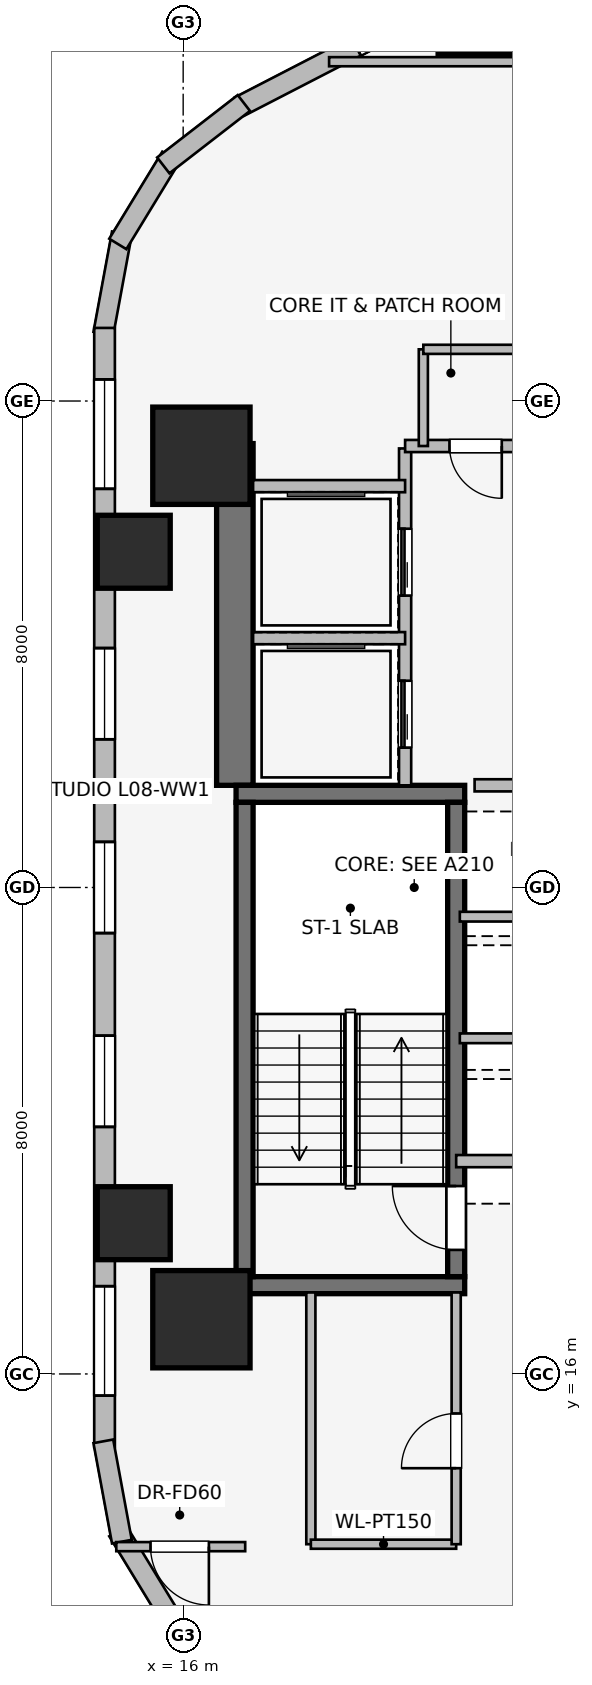
"""IFC4 building model, lengths in metres.
Left out: names, types, materials, properties, quantities, classifications, styles, units other than length and angle.
Written with IfcOpenShell. Run it as: python <this file> out.ifc"""

import sys

from ifc_helpers import new_model, si_unit, direction, frame, frame_2d, origin, origin_2d, place, context, subcontext, project, spatial, rectangle, extrude, element, fill, save


model = new_model("IFC4")
c1 = context("Model", 3, precision=1e-05, world=origin(), true_north=direction((0.0, 1.0)))
c2 = subcontext(c1, "Body", "Model", "MODEL_VIEW")
j1 = project(units=[si_unit("LENGTHUNIT", "METRE"), si_unit("PLANEANGLEUNIT", "RADIAN")], contexts=[c1])
p1 = place(None, origin())
s1 = spatial("IfcSite", under=j1, at=p1, CompositionType="ELEMENT")
p2 = place(p1, origin())
s2 = spatial("IfcBuilding", under=s1, at=p2, CompositionType="ELEMENT")
p3 = place(p2, frame((0.0, 0.0, 34.3)))
s3 = spatial("IfcBuildingStorey", under=s2, at=p3, CompositionType="ELEMENT", Elevation=34.3)
p4 = place(p3, frame((16.85, 25.68, 0.0), z_axis=(0.0, 0.0, 1.0), x_axis=(0.0, 1.0, 0.0)))
e1 = element("IfcWall", 1, at=p4, inside=s3, PredefinedType="SHEAR", context=c2, shape_type="SweptSolid", body=[
    extrude(rectangle(XDim=5.62, YDim=0.6, at=frame_2d((2.81, 0.0))), origin(), (0.0, 0.0, 1.0), 3.65),
])
for number, where, z_axis, x_axis in (
    (2, (16.87, 17.46, 0.0), (0.0, 0.0, 1.0), (1.0, 0.0, 0.0)),
    (3, (20.63, 25.54, 0.0), (0.0, 0.0, 1.0), (-1.0, 0.0, 0.0)),
):
    element("IfcWall", number, at=place(p3, frame(where, z_axis=z_axis, x_axis=x_axis)), inside=s3, PredefinedType="SHEAR", context=c2, shape_type="SweptSolid", body=[
        extrude(rectangle(XDim=3.76, YDim=0.28, at=frame_2d((1.88, 0.0))), origin(), (0.0, 0.0, 1.0), 3.65),
    ])
p5 = place(p3, frame((17.01, 25.4, 0.0), z_axis=(0.0, 0.0, 1.0), x_axis=(0.0, -1.0, 0.0)))
e4 = element("IfcWall", 4, at=p5, inside=s3, PredefinedType="SHEAR", context=c2, shape_type="SweptSolid", body=[
    extrude(rectangle(XDim=7.8, YDim=0.28, at=frame_2d((3.9, 0.0))), origin(), (0.0, 0.0, 1.0), 3.65),
])
p6 = place(p3, frame((20.49, 17.6, 0.0), z_axis=(0.0, 0.0, 1.0), x_axis=(0.0, 1.0, 0.0)))
e5 = element("IfcWall", 5, at=p6, inside=s3, PredefinedType="SHEAR", context=c2, shape_type="SweptSolid", body=[
    extrude(rectangle(XDim=7.8, YDim=0.28, at=frame_2d((3.9, 0.0))), origin(), (0.0, 0.0, 1.0), 3.65),
])
p7 = place(p6, frame((0.44, 0.0, 0.0)))
e6 = element("IfcOpeningElement", 6, at=p7, cuts=e5, PredefinedType="OPENING", context=c2, shape_type="SweptSolid", body=[
    extrude(rectangle(XDim=1.05, YDim=2.0, at=frame_2d((0.525, 1.0))), frame((0.0, 0.15, 0.0), z_axis=(0.0, -1.0, 0.0), x_axis=(1.0, 0.0, 0.0)), (0.0, 0.0, 1.0), 0.3),
])
for number, where, z_axis, x_axis in (
    (7, (16.3, 16.9, 0.0), (0.0, 0.0, 1.0), (1.0, 0.0, 0.0)),
    (8, (16.3, 31.1, 0.0), (0.0, 0.0, 1.0), (1.0, 0.0, 0.0)),
):
    element("IfcColumn", number, at=place(p3, frame(where, z_axis=z_axis, x_axis=x_axis)), inside=s3, PredefinedType="COLUMN", context=c2, shape_type="SweptSolid", body=[
        extrude(rectangle(XDim=1.6, YDim=1.6, at=origin_2d()), origin(), (0.0, 0.0, 1.0), 3.65),
    ])
for number, where, z_axis, x_axis in (
    (9, (20.793, 38.298, 0.0), (0.0, 0.0, 1.0), (1.0, 0.0, 0.0)),
    (10, (15.187, 29.521, 0.0), (0.0, 0.0, 1.0), (1.0, 0.0, 0.0)),
    (11, (15.187, 18.479, 0.0), (0.0, 0.0, 1.0), (1.0, 0.0, 0.0)),
):
    element("IfcColumn", number, at=place(p3, frame(where, z_axis=z_axis, x_axis=x_axis)), inside=s3, PredefinedType="COLUMN", context=c2, shape_type="SweptSolid", body=[
        extrude(rectangle(XDim=1.2, YDim=1.2, at=origin_2d()), origin(), (0.0, 0.0, 1.0), 3.65),
    ])
p8 = place(p3, frame((16.924, 36.841, 0.0), z_axis=(0.0, 0.0, 1.0), x_axis=(0.888634413993, 0.458616264721, 0.0)))
e12 = element("IfcWall", 12, at=p8, inside=s3, PredefinedType="STANDARD", context=c2, shape_type="SweptSolid", body=[
    extrude(rectangle(XDim=20.531, YDim=0.34, at=frame_2d((10.266, 0.0))), origin(), (0.0, 0.0, 1.0), 2.684),
])
p9 = place(p8, frame((2.161, 0.0, 0.75)))
e13 = element("IfcOpeningElement", 13, at=p9, cuts=e12, PredefinedType="OPENING", context=c2, shape_type="SweptSolid", body=[
    extrude(rectangle(XDim=1.05, YDim=1.4, at=frame_2d((0.525, 0.7))), frame((0.0, 0.18, 0.0), z_axis=(0.0, -1.0, 0.0), x_axis=(1.0, 0.0, 0.0)), (0.0, 0.0, 1.0), 0.36),
])
p10 = place(p8, frame((5.903, 0.0, 0.75)))
e14 = element("IfcOpeningElement", 14, at=p10, cuts=e12, PredefinedType="OPENING", context=c2, shape_type="SweptSolid", body=[
    extrude(rectangle(XDim=1.5, YDim=1.5, at=frame_2d((0.75, 0.75))), frame((0.0, 0.18, 0.0), z_axis=(0.0, -1.0, 0.0), x_axis=(1.0, 0.0, 0.0)), (0.0, 0.0, 1.0), 0.36),
])
p11 = place(p8, frame((9.516, 0.0, 0.75)))
e15 = element("IfcOpeningElement", 15, at=p11, cuts=e12, PredefinedType="OPENING", context=c2, shape_type="SweptSolid", body=[
    extrude(rectangle(XDim=1.5, YDim=1.5, at=frame_2d((0.75, 0.75))), frame((0.0, 0.18, 0.0), z_axis=(0.0, -1.0, 0.0), x_axis=(1.0, 0.0, 0.0)), (0.0, 0.0, 1.0), 0.36),
])
p12 = place(p8, frame((13.129, 0.0, 0.75)))
e16 = element("IfcOpeningElement", 16, at=p12, cuts=e12, PredefinedType="OPENING", context=c2, shape_type="SweptSolid", body=[
    extrude(rectangle(XDim=1.5, YDim=1.5, at=frame_2d((0.75, 0.75))), frame((0.0, 0.18, 0.0), z_axis=(0.0, -1.0, 0.0), x_axis=(1.0, 0.0, 0.0)), (0.0, 0.0, 1.0), 0.36),
])
p13 = place(p8, frame((17.476, 0.0, 0.75)))
e17 = element("IfcOpeningElement", 17, at=p13, cuts=e12, PredefinedType="OPENING", context=c2, shape_type="SweptSolid", body=[
    extrude(rectangle(XDim=1.05, YDim=1.4, at=frame_2d((0.525, 0.7))), frame((0.0, 0.18, 0.0), z_axis=(0.0, -1.0, 0.0), x_axis=(1.0, 0.0, 0.0)), (0.0, 0.0, 1.0), 0.36),
])
p14 = place(p3, frame((14.687, 33.108, 0.0), z_axis=(0.0, 0.0, 1.0), x_axis=(0.181714143354, 0.983351397063, 0.0)))
e18 = element("IfcWall", 18, at=p14, inside=s3, PredefinedType="STANDARD", context=c2, shape_type="SweptSolid", body=[
    extrude(rectangle(XDim=1.678, YDim=0.33, at=frame_2d((0.839, 0.0))), origin(), (0.0, 0.0, 1.0), 3.39),
])
p15 = place(p3, frame((14.925, 34.583, 0.0), z_axis=(0.0, 0.0, 1.0), x_axis=(0.520584129191, 0.853810379671, 0.0)))
e19 = element("IfcWall", 19, at=p15, inside=s3, PredefinedType="STANDARD", context=c2, shape_type="SweptSolid", body=[
    extrude(rectangle(XDim=1.677, YDim=0.33, at=frame_2d((0.838, 0.0))), origin(), (0.0, 0.0, 1.0), 3.39),
])
p16 = place(p3, frame((15.673, 35.875, 0.0), z_axis=(0.0, 0.0, 1.0), x_axis=(0.790691856293, 0.61221433207, 0.0)))
e20 = element("IfcWall", 20, at=p16, inside=s3, PredefinedType="STANDARD", context=c2, shape_type="SweptSolid", body=[
    extrude(rectangle(XDim=1.676, YDim=0.33, at=frame_2d((0.838, 0.0))), origin(), (0.0, 0.0, 1.0), 3.39),
])
p17 = place(p3, frame((14.707, 14.798, 0.0), z_axis=(0.0, 0.0, 1.0), x_axis=(0.0, 1.0, 0.0)))
e21 = element("IfcWall", 21, at=p17, inside=s3, PredefinedType="STANDARD", context=c2, shape_type="SweptSolid", body=[
    extrude(rectangle(XDim=18.404, YDim=0.34, at=frame_2d((9.202, 0.0))), origin(), (0.0, 0.0, 1.0), 2.684),
])
p18 = place(p17, frame((0.845, 0.0, 0.75)))
e22 = element("IfcOpeningElement", 22, at=p18, cuts=e21, PredefinedType="OPENING", context=c2, shape_type="SweptSolid", body=[
    extrude(rectangle(XDim=1.8, YDim=1.5, at=frame_2d((0.9, 0.75))), frame((0.0, 0.18, 0.0), z_axis=(0.0, -1.0, 0.0), x_axis=(1.0, 0.0, 0.0)), (0.0, 0.0, 1.0), 0.36),
])
p19 = place(p17, frame((5.265, 0.0, 0.75)))
e23 = element("IfcOpeningElement", 23, at=p19, cuts=e21, PredefinedType="OPENING", context=c2, shape_type="SweptSolid", body=[
    extrude(rectangle(XDim=1.5, YDim=1.5, at=frame_2d((0.75, 0.75))), frame((0.0, 0.18, 0.0), z_axis=(0.0, -1.0, 0.0), x_axis=(1.0, 0.0, 0.0)), (0.0, 0.0, 1.0), 0.36),
])
p20 = place(p17, frame((8.452, 0.0, 0.75)))
e24 = element("IfcOpeningElement", 24, at=p20, cuts=e21, PredefinedType="OPENING", context=c2, shape_type="SweptSolid", body=[
    extrude(rectangle(XDim=1.5, YDim=1.5, at=frame_2d((0.75, 0.75))), frame((0.0, 0.18, 0.0), z_axis=(0.0, -1.0, 0.0), x_axis=(1.0, 0.0, 0.0)), (0.0, 0.0, 1.0), 0.36),
])
p21 = place(p17, frame((11.639, 0.0, 0.75)))
e25 = element("IfcOpeningElement", 25, at=p21, cuts=e21, PredefinedType="OPENING", context=c2, shape_type="SweptSolid", body=[
    extrude(rectangle(XDim=1.5, YDim=1.5, at=frame_2d((0.75, 0.75))), frame((0.0, 0.18, 0.0), z_axis=(0.0, -1.0, 0.0), x_axis=(1.0, 0.0, 0.0)), (0.0, 0.0, 1.0), 0.36),
])
p22 = place(p17, frame((15.758, 0.0, 0.75)))
e26 = element("IfcOpeningElement", 26, at=p22, cuts=e21, PredefinedType="OPENING", context=c2, shape_type="SweptSolid", body=[
    extrude(rectangle(XDim=1.8, YDim=1.5, at=frame_2d((0.9, 0.75))), frame((0.0, 0.18, 0.0), z_axis=(0.0, -1.0, 0.0), x_axis=(1.0, 0.0, 0.0)), (0.0, 0.0, 1.0), 0.36),
])
p23 = place(p3, frame((16.998, 11.099, 0.0), z_axis=(0.0, 0.0, 1.0), x_axis=(-0.790691856293, 0.61221433207, 0.0)))
e27 = element("IfcWall", 27, at=p23, inside=s3, PredefinedType="STANDARD", context=c2, shape_type="SweptSolid", body=[
    extrude(rectangle(XDim=1.676, YDim=0.33, at=frame_2d((0.838, 0.0))), origin(), (0.0, 0.0, 1.0), 3.39),
])
p24 = place(p3, frame((15.798, 11.985, 0.0), z_axis=(0.0, 0.0, 1.0), x_axis=(-0.520584129191, 0.853810379671, 0.0)))
e28 = element("IfcWall", 28, at=p24, inside=s3, PredefinedType="STANDARD", context=c2, shape_type="SweptSolid", body=[
    extrude(rectangle(XDim=1.677, YDim=0.33, at=frame_2d((0.838, 0.0))), origin(), (0.0, 0.0, 1.0), 3.39),
])
p25 = place(p3, frame((14.992, 13.242, 0.0), z_axis=(0.0, 0.0, 1.0), x_axis=(-0.181714143354, 0.983351397063, 0.0)))
e29 = element("IfcWall", 29, at=p25, inside=s3, PredefinedType="STANDARD", context=c2, shape_type="SweptSolid", body=[
    extrude(rectangle(XDim=1.678, YDim=0.33, at=frame_2d((0.839, 0.0))), origin(), (0.0, 0.0, 1.0), 3.39),
])
p26 = place(p3, frame((19.65, 25.68, 0.0), z_axis=(0.0, 0.0, 1.0), x_axis=(0.0, 1.0, 0.0)))
e30 = element("IfcWall", 30, at=p26, inside=s3, PredefinedType="PARTITIONING", context=c2, shape_type="SweptSolid", body=[
    extrude(rectangle(XDim=5.54, YDim=0.2, at=frame_2d((2.77, 0.0))), origin(), (0.0, 0.0, 1.0), 3.39),
])
p27 = place(p26, frame((0.62, 0.0, 0.0)))
e31 = element("IfcOpeningElement", 31, at=p27, cuts=e30, PredefinedType="OPENING", context=c2, shape_type="SweptSolid", body=[
    extrude(rectangle(XDim=1.1, YDim=2.2, at=frame_2d((0.55, 1.1))), frame((0.0, 0.11, 0.0), z_axis=(0.0, -1.0, 0.0), x_axis=(1.0, 0.0, 0.0)), (0.0, 0.0, 1.0), 0.22),
])
p28 = place(p26, frame((3.12, 0.0, 0.0)))
e32 = element("IfcOpeningElement", 32, at=p28, cuts=e30, PredefinedType="OPENING", context=c2, shape_type="SweptSolid", body=[
    extrude(rectangle(XDim=1.1, YDim=2.2, at=frame_2d((0.55, 1.1))), frame((0.0, 0.11, 0.0), z_axis=(0.0, -1.0, 0.0), x_axis=(1.0, 0.0, 0.0)), (0.0, 0.0, 1.0), 0.22),
])
p29 = place(p3, frame((20.793, 25.68, 0.0), z_axis=(0.0, 0.0, 1.0), x_axis=(1.0, 0.0, 0.0)))
e33 = element("IfcWall", 33, at=p29, inside=s3, PredefinedType="PARTITIONING", context=c2, shape_type="SweptSolid", body=[
    extrude(rectangle(XDim=2.887, YDim=0.2, at=frame_2d((1.443, 0.0))), origin(), (0.0, 0.0, 1.0), 3.39),
])
p30 = place(p3, frame((21.66, 31.26, 0.0), z_axis=(0.0, 0.0, 1.0), x_axis=(-1.0, 0.0, 0.0)))
e34 = element("IfcWall", 34, at=p30, inside=s3, PredefinedType="PARTITIONING", context=c2, shape_type="SweptSolid", body=[
    extrude(rectangle(XDim=2.01, YDim=0.2, at=frame_2d((1.005, 0.0))), origin(), (0.0, 0.0, 1.0), 3.39),
])
p31 = place(p30, frame((0.42, 0.0, 0.0)))
e35 = element("IfcOpeningElement", 35, at=p31, cuts=e34, PredefinedType="OPENING", context=c2, shape_type="SweptSolid", body=[
    extrude(rectangle(XDim=0.86, YDim=2.0, at=frame_2d((0.43, 1.0))), frame((0.0, 0.11, 0.0), z_axis=(0.0, -1.0, 0.0), x_axis=(1.0, 0.0, 0.0)), (0.0, 0.0, 1.0), 0.22),
])
p32 = place(p3, frame((17.15, 28.1, 0.0), z_axis=(0.0, 0.0, 1.0), x_axis=(1.0, 0.0, 0.0)))
e36 = element("IfcWall", 36, at=p32, inside=s3, PredefinedType="PARTITIONING", context=c2, shape_type="SweptSolid", body=[
    extrude(rectangle(XDim=2.5, YDim=0.2, at=frame_2d((1.25, 0.0))), origin(), (0.0, 0.0, 1.0), 3.39),
])
p33 = place(p3, frame((19.65, 30.6, 0.0), z_axis=(0.0, 0.0, 1.0), x_axis=(-1.0, 0.0, 0.0)))
e37 = element("IfcWall", 37, at=p33, inside=s3, PredefinedType="PARTITIONING", context=c2, shape_type="SweptSolid", body=[
    extrude(rectangle(XDim=2.5, YDim=0.2, at=frame_2d((1.25, 0.0))), origin(), (0.0, 0.0, 1.0), 2.29),
])
p34 = place(p3, frame((20.49, 19.5, 0.0), z_axis=(0.0, 0.0, 1.0), x_axis=(1.0, 0.0, 0.0)))
e38 = element("IfcWall", 38, at=p34, inside=s3, PredefinedType="PARTITIONING", context=c2, shape_type="SweptSolid", body=[
    extrude(rectangle(XDim=2.41, YDim=0.2, at=frame_2d((1.205, 0.0))), origin(), (0.0, 0.0, 1.0), 2.29),
])
for number, where, z_axis, x_axis in (
    (39, (20.55, 21.52, 0.0), (0.0, 0.0, 1.0), (1.0, 0.0, 0.0)),
    (40, (20.55, 23.52, 0.0), (0.0, 0.0, 1.0), (1.0, 0.0, 0.0)),
):
    element("IfcWall", number, at=place(p3, frame(where, z_axis=z_axis, x_axis=x_axis)), inside=s3, PredefinedType="PARTITIONING", context=c2, shape_type="SweptSolid", body=[
        extrude(rectangle(XDim=2.35, YDim=0.16, at=frame_2d((1.175, 0.0))), origin(), (0.0, 0.0, 1.0), 3.39),
    ])
p35 = place(p3, frame((18.1, 17.34, 0.0), z_axis=(0.0, 0.0, 1.0), x_axis=(0.0, -1.0, 0.0)))
e41 = element("IfcWall", 41, at=p35, inside=s3, PredefinedType="PARTITIONING", context=c2, shape_type="SweptSolid", body=[
    extrude(rectangle(XDim=4.14, YDim=0.15, at=frame_2d((2.07, 0.0))), origin(), (0.0, 0.0, 1.0), 3.39),
])
p36 = place(p3, frame((18.1, 13.2, 0.0), z_axis=(0.0, 0.0, 1.0), x_axis=(1.0, 0.0, 0.0)))
e42 = element("IfcWall", 42, at=p36, inside=s3, PredefinedType="PARTITIONING", context=c2, shape_type="SweptSolid", body=[
    extrude(rectangle(XDim=2.39, YDim=0.15, at=frame_2d((1.195, 0.0))), origin(), (0.0, 0.0, 1.0), 3.39),
])
p37 = place(p3, frame((20.49, 13.2, 0.0), z_axis=(0.0, 0.0, 1.0), x_axis=(0.0, 1.0, 0.0)))
e43 = element("IfcWall", 43, at=p37, inside=s3, PredefinedType="PARTITIONING", context=c2, shape_type="SweptSolid", body=[
    extrude(rectangle(XDim=4.14, YDim=0.15, at=frame_2d((2.07, 0.0))), origin(), (0.0, 0.0, 1.0), 3.39),
])
p38 = place(p37, frame((1.25, 0.0, 0.0)))
e44 = element("IfcOpeningElement", 44, at=p38, cuts=e43, PredefinedType="OPENING", context=c2, shape_type="SweptSolid", body=[
    extrude(rectangle(XDim=0.9, YDim=2.0, at=frame_2d((0.45, 1.0))), frame((0.0, 0.085, 0.0), z_axis=(0.0, -1.0, 0.0), x_axis=(1.0, 0.0, 0.0)), (0.0, 0.0, 1.0), 0.17),
])
p39 = place(p3, frame((19.95, 32.85, 0.0), z_axis=(0.0, 0.0, 1.0), x_axis=(0.0, -1.0, 0.0)))
e45 = element("IfcWall", 45, at=p39, inside=s3, PredefinedType="PARTITIONING", context=c2, shape_type="SweptSolid", body=[
    extrude(rectangle(XDim=1.59, YDim=0.15, at=frame_2d((0.795, 0.0))), origin(), (0.0, 0.0, 1.0), 3.39),
])
p40 = place(p3, frame((21.66, 32.85, 0.0), z_axis=(0.0, 0.0, 1.0), x_axis=(-1.0, 0.0, 0.0)))
e46 = element("IfcWall", 46, at=p40, inside=s3, PredefinedType="PARTITIONING", context=c2, shape_type="SweptSolid", body=[
    extrude(rectangle(XDim=1.71, YDim=0.15, at=frame_2d((0.855, 0.0))), origin(), (0.0, 0.0, 1.0), 3.39),
])
p41 = place(p3, frame((17.02, 13.16, 0.0), z_axis=(0.0, 0.0, 1.0), x_axis=(-1.0, 0.0, 0.0)))
e47 = element("IfcWall", 47, at=p41, inside=s3, PredefinedType="PARTITIONING", context=c2, shape_type="SweptSolid", body=[
    extrude(rectangle(XDim=2.12, YDim=0.15, at=frame_2d((1.06, 0.0))), origin(), (0.0, 0.0, 1.0), 3.39),
])
p42 = place(p41, frame((0.597, 0.0, 0.0)))
e48 = element("IfcOpeningElement", 48, at=p42, cuts=e47, PredefinedType="OPENING", context=c2, shape_type="SweptSolid", body=[
    extrude(rectangle(XDim=0.96, YDim=2.0, at=frame_2d((0.48, 1.0))), frame((0.0, 0.085, 0.0), z_axis=(0.0, -1.0, 0.0), x_axis=(1.0, 0.0, 0.0)), (0.0, 0.0, 1.0), 0.17),
])
p43 = place(p3, frame((34.0, 37.58, 0.0), z_axis=(0.0, 0.0, 1.0), x_axis=(-1.0, 0.0, 0.0)))
e49 = element("IfcWall", 49, at=p43, inside=s3, PredefinedType="PARTITIONING", context=c2, shape_type="SweptSolid", body=[
    extrude(rectangle(XDim=15.6, YDim=0.15, at=frame_2d((7.8, 0.0))), origin(), (0.0, 0.0, 1.0), 3.39),
])
p44 = place(p43, frame((5.195, 0.0, 0.0)))
e50 = element("IfcOpeningElement", 50, at=p44, cuts=e49, PredefinedType="OPENING", context=c2, shape_type="SweptSolid", body=[
    extrude(rectangle(XDim=0.96, YDim=2.0, at=frame_2d((0.48, 1.0))), frame((0.0, 0.085, 0.0), z_axis=(0.0, -1.0, 0.0), x_axis=(1.0, 0.0, 0.0)), (0.0, 0.0, 1.0), 0.17),
])
p45 = place(p18, origin())
e51 = element("IfcWindow", 51, at=p45, inside=s3, PartitioningType="SINGLE_PANEL", PredefinedType="WINDOW", context=c2, shape_type="SweptSolid", body=[
    extrude(rectangle(XDim=1.8, YDim=1.5, at=frame_2d((0.9, 0.75))), frame((0.0, 0.03, 0.0), z_axis=(0.0, -1.0, 0.0), x_axis=(1.0, 0.0, 0.0)), (0.0, 0.0, 1.0), 0.06),
])
fill(e22, e51)
p46 = place(p19, origin())
e52 = element("IfcWindow", 52, at=p46, inside=s3, PartitioningType="SINGLE_PANEL", PredefinedType="WINDOW", context=c2, shape_type="SweptSolid", body=[
    extrude(rectangle(XDim=1.5, YDim=1.5, at=frame_2d((0.75, 0.75))), frame((0.0, 0.03, 0.0), z_axis=(0.0, -1.0, 0.0), x_axis=(1.0, 0.0, 0.0)), (0.0, 0.0, 1.0), 0.06),
])
fill(e23, e52)
p47 = place(p20, origin())
e53 = element("IfcWindow", 53, at=p47, inside=s3, PartitioningType="SINGLE_PANEL", PredefinedType="WINDOW", context=c2, shape_type="SweptSolid", body=[
    extrude(rectangle(XDim=1.5, YDim=1.5, at=frame_2d((0.75, 0.75))), frame((0.0, 0.03, 0.0), z_axis=(0.0, -1.0, 0.0), x_axis=(1.0, 0.0, 0.0)), (0.0, 0.0, 1.0), 0.06),
])
fill(e24, e53)
p48 = place(p21, origin())
e54 = element("IfcWindow", 54, at=p48, inside=s3, PartitioningType="SINGLE_PANEL", PredefinedType="WINDOW", context=c2, shape_type="SweptSolid", body=[
    extrude(rectangle(XDim=1.5, YDim=1.5, at=frame_2d((0.75, 0.75))), frame((0.0, 0.03, 0.0), z_axis=(0.0, -1.0, 0.0), x_axis=(1.0, 0.0, 0.0)), (0.0, 0.0, 1.0), 0.06),
])
fill(e25, e54)
p49 = place(p22, origin())
e55 = element("IfcWindow", 55, at=p49, inside=s3, PartitioningType="SINGLE_PANEL", PredefinedType="WINDOW", context=c2, shape_type="SweptSolid", body=[
    extrude(rectangle(XDim=1.8, YDim=1.5, at=frame_2d((0.9, 0.75))), frame((0.0, 0.03, 0.0), z_axis=(0.0, -1.0, 0.0), x_axis=(1.0, 0.0, 0.0)), (0.0, 0.0, 1.0), 0.06),
])
fill(e26, e55)
p50 = place(p7, origin())
e56 = element("IfcDoor", 56, at=p50, inside=s3, OperationType="SINGLE_SWING_RIGHT", PredefinedType="DOOR", context=c2, shape_type="SweptSolid", body=[
    extrude(rectangle(XDim=1.05, YDim=2.0, at=frame_2d((0.525, 1.0))), frame((0.0, 0.025, 0.0), z_axis=(0.0, -1.0, 0.0), x_axis=(1.0, 0.0, 0.0)), (0.0, 0.0, 1.0), 0.05),
])
fill(e6, e56)
p51 = place(p27, origin())
e57 = element("IfcDoor", 57, at=p51, inside=s3, OperationType="SLIDING_TO_LEFT", PredefinedType="DOOR", context=c2, shape_type="SweptSolid", body=[
    extrude(rectangle(XDim=1.1, YDim=2.2, at=frame_2d((0.55, 1.1))), frame((0.0, 0.025, 0.0), z_axis=(0.0, -1.0, 0.0), x_axis=(1.0, 0.0, 0.0)), (0.0, 0.0, 1.0), 0.05),
])
fill(e31, e57)
p52 = place(p28, origin())
e58 = element("IfcDoor", 58, at=p52, inside=s3, OperationType="SLIDING_TO_LEFT", PredefinedType="DOOR", context=c2, shape_type="SweptSolid", body=[
    extrude(rectangle(XDim=1.1, YDim=2.2, at=frame_2d((0.55, 1.1))), frame((0.0, 0.025, 0.0), z_axis=(0.0, -1.0, 0.0), x_axis=(1.0, 0.0, 0.0)), (0.0, 0.0, 1.0), 0.05),
])
fill(e32, e58)
p53 = place(p31, origin())
e59 = element("IfcDoor", 59, at=p53, inside=s3, OperationType="SINGLE_SWING_LEFT", PredefinedType="DOOR", context=c2, shape_type="SweptSolid", body=[
    extrude(rectangle(XDim=0.86, YDim=2.0, at=frame_2d((0.43, 1.0))), frame((0.0, 0.025, 0.0), z_axis=(0.0, -1.0, 0.0), x_axis=(1.0, 0.0, 0.0)), (0.0, 0.0, 1.0), 0.05),
])
fill(e35, e59)
p54 = place(p38, origin())
e60 = element("IfcDoor", 60, at=p54, inside=s3, OperationType="SINGLE_SWING_LEFT", PredefinedType="DOOR", context=c2, shape_type="SweptSolid", body=[
    extrude(rectangle(XDim=0.9, YDim=2.0, at=frame_2d((0.45, 1.0))), frame((0.0, 0.025, 0.0), z_axis=(0.0, -1.0, 0.0), x_axis=(1.0, 0.0, 0.0)), (0.0, 0.0, 1.0), 0.05),
])
fill(e44, e60)
p55 = place(p42, origin())
e61 = element("IfcDoor", 61, at=p55, inside=s3, OperationType="SINGLE_SWING_LEFT", PredefinedType="DOOR", context=c2, shape_type="SweptSolid", body=[
    extrude(rectangle(XDim=0.96, YDim=2.0, at=frame_2d((0.48, 1.0))), frame((0.0, 0.025, 0.0), z_axis=(0.0, -1.0, 0.0), x_axis=(1.0, 0.0, 0.0)), (0.0, 0.0, 1.0), 0.05),
])
fill(e48, e61)
save(model, sys.argv[1])
